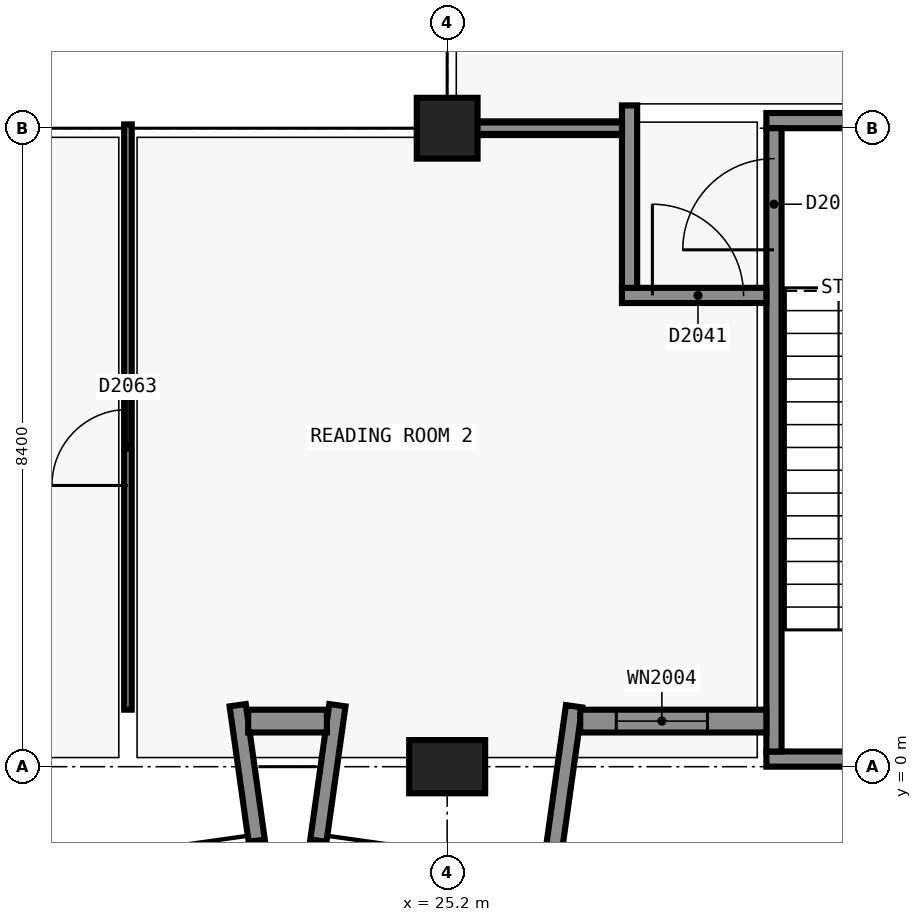
"""IFC4 building model, lengths in metres.
Left out: names, types, materials, properties, quantities, classifications, styles, units other than length and angle.
Written with IfcOpenShell. Run it as: python <this file> out.ifc"""

import sys

from ifc_helpers import new_model, si_unit, direction, frame, frame_2d, origin, origin_2d, place, context, subcontext, project, spatial, rectangle, extrude, element, fill, save


model = new_model("IFC4")
c1 = context("Model", 3, precision=1e-05, world=origin(), true_north=direction((0.0, 1.0)))
c2 = subcontext(c1, "Body", "Model", "MODEL_VIEW")
j1 = project(units=[si_unit("LENGTHUNIT", "METRE"), si_unit("PLANEANGLEUNIT", "RADIAN")], contexts=[c1])
p1 = place(None, origin())
s1 = spatial("IfcSite", under=j1, at=p1, CompositionType="ELEMENT")
p2 = place(p1, origin())
s2 = spatial("IfcBuilding", under=s1, at=p2, CompositionType="ELEMENT")
p3 = place(p2, frame((0.0, 0.0, 10.2)))
s3 = spatial("IfcBuildingStorey", under=s2, at=p3, CompositionType="ELEMENT", Elevation=10.2)
p4 = place(p3, frame((33.6, 0.1, 0.0), z_axis=(0.0, 0.0, 1.0), x_axis=(-1.0, 0.0, 0.0)))
e1 = element("IfcWall", 1, at=p4, inside=s3, PredefinedType="SHEAR", context=c2, shape_type="SweptSolid", body=[
    extrude(rectangle(XDim=4.2, YDim=0.2, at=frame_2d((2.1, 0.0))), origin(), (0.0, 0.0, 1.0), 4.8),
])
p5 = place(p3, frame((29.4, 8.5, 0.0), z_axis=(0.0, 0.0, 1.0), x_axis=(1.0, 0.0, 0.0)))
e2 = element("IfcWall", 2, at=p5, inside=s3, PredefinedType="SHEAR", context=c2, shape_type="SweptSolid", body=[
    extrude(rectangle(XDim=4.2, YDim=0.2, at=frame_2d((2.1, 0.0))), origin(), (0.0, 0.0, 1.0), 4.8),
])
p6 = place(p5, frame((1.5, 0.0, 0.0)))
e3 = element("IfcOpeningElement", 3, at=p6, cuts=e2, PredefinedType="OPENING", context=c2, shape_type="SweptSolid", body=[
    extrude(rectangle(XDim=1.2, YDim=2.1, at=frame_2d((0.6, 1.05))), frame((0.0, 0.11, 0.0), z_axis=(0.0, -1.0, 0.0), x_axis=(1.0, 0.0, 0.0)), (0.0, 0.0, 1.0), 0.22),
])
p7 = place(p3, frame((29.5, 0.2, 0.0), z_axis=(0.0, 0.0, 1.0), x_axis=(0.0, 1.0, 0.0)))
e4 = element("IfcWall", 4, at=p7, inside=s3, PredefinedType="SHEAR", context=c2, shape_type="SweptSolid", body=[
    extrude(rectangle(XDim=8.2, YDim=0.2, at=frame_2d((4.1, 0.0))), origin(), (0.0, 0.0, 1.0), 4.8),
])
p8 = place(p7, frame((6.6, 0.0, 0.0)))
e5 = element("IfcOpeningElement", 5, at=p8, cuts=e4, PredefinedType="OPENING", context=c2, shape_type="SweptSolid", body=[
    extrude(rectangle(XDim=1.2, YDim=2.1, at=frame_2d((0.6, 1.05))), frame((0.0, 0.11, 0.0), z_axis=(0.0, -1.0, 0.0), x_axis=(1.0, 0.0, 0.0)), (0.0, 0.0, 1.0), 0.22),
])
p9 = place(p3, frame((25.2, 0.0, 0.0), z_axis=(0.0, 0.0, 1.0), x_axis=(1.0, 0.0, 0.0)))
e6 = element("IfcColumn", 6, at=p9, inside=s3, PredefinedType="COLUMN", context=c2, shape_type="SweptSolid", body=[
    extrude(rectangle(XDim=1.0, YDim=0.7, at=origin_2d()), origin(), (0.0, 0.0, 1.0), 4.8),
])
p10 = place(p3, frame((25.2, 8.4, 0.0), z_axis=(0.0, 0.0, 1.0), x_axis=(1.0, 0.0, 0.0)))
e7 = element("IfcColumn", 7, at=p10, inside=s3, PredefinedType="COLUMN", context=c2, shape_type="SweptSolid", body=[
    extrude(rectangle(XDim=0.8, YDim=0.8, at=origin_2d()), origin(), (0.0, 0.0, 1.0), 4.8),
])
for number, where, z_axis, x_axis in (
    (8, (22.444, 0.809, 0.0), (0.0, 0.0, 1.0), (0.139, -0.99, 0.0)),
    (9, (23.756, 0.809, 0.0), (0.0, 0.0, 1.0), (-0.139, -0.99, 0.0)),
):
    element("IfcWall", number, at=place(p3, frame(where, z_axis=z_axis, x_axis=x_axis)), inside=s3, PredefinedType="SOLIDWALL", context=c2, shape_type="SweptSolid", body=[
        extrude(rectangle(XDim=1.8, YDim=0.215, at=frame_2d((0.9, 0.0))), origin(), (0.0, 0.0, 1.0), 4.5),
    ])
p11 = place(p3, frame((26.869, 0.795, 0.0), z_axis=(0.0, 0.0, 1.0), x_axis=(-0.139141913905, -0.990272451295, 0.0)))
e10 = element("IfcWall", 10, at=p11, inside=s3, PredefinedType="SOLIDWALL", context=c2, shape_type="SweptSolid", body=[
    extrude(rectangle(XDim=2.219, YDim=0.215, at=frame_2d((1.11, 0.0))), origin(), (0.0, 0.0, 1.0), 4.5),
])
p12 = place(p3, frame((23.618, 0.6, 0.0), z_axis=(0.0, 0.0, 1.0), x_axis=(-1.0, 0.0, 0.0)))
e11 = element("IfcWall", 11, at=p12, inside=s3, PredefinedType="SOLIDWALL", context=c2, shape_type="SweptSolid", body=[
    extrude(rectangle(XDim=1.036, YDim=0.3, at=frame_2d((0.518, 0.0))), origin(), (0.0, 0.0, 1.0), 4.5),
])
p13 = place(p3, frame((29.4, 0.6, 0.0), z_axis=(0.0, 0.0, 1.0), x_axis=(-1.0, 0.0, 0.0)))
e12 = element("IfcWall", 12, at=p13, inside=s3, PredefinedType="SOLIDWALL", context=c2, shape_type="SweptSolid", body=[
    extrude(rectangle(XDim=2.449, YDim=0.3, at=frame_2d((1.225, 0.0))), origin(), (0.0, 0.0, 1.0), 4.5),
])
p14 = place(p13, frame((0.775, 0.0, 0.9)))
e13 = element("IfcOpeningElement", 13, at=p14, cuts=e12, PredefinedType="OPENING", context=c2, shape_type="SweptSolid", body=[
    extrude(rectangle(XDim=1.2, YDim=1.5, at=frame_2d((0.6, 0.75))), frame((0.0, 0.16, 0.0), z_axis=(0.0, -1.0, 0.0), x_axis=(1.0, 0.0, 0.0)), (0.0, 0.0, 1.0), 0.32),
])
p15 = place(p3, frame((27.5, 6.2, 0.0), z_axis=(0.0, 0.0, 1.0), x_axis=(1.0, 0.0, 0.0)))
e14 = element("IfcWall", 14, at=p15, inside=s3, PredefinedType="SOLIDWALL", context=c2, shape_type="SweptSolid", body=[
    extrude(rectangle(XDim=1.9, YDim=0.2, at=frame_2d((0.95, 0.0))), origin(), (0.0, 0.0, 1.0), 4.5),
])
p16 = place(p15, frame((0.4, 0.0, 0.0)))
e15 = element("IfcOpeningElement", 15, at=p16, cuts=e14, PredefinedType="OPENING", context=c2, shape_type="SweptSolid", body=[
    extrude(rectangle(XDim=1.2, YDim=2.1, at=frame_2d((0.6, 1.05))), frame((0.0, 0.11, 0.0), z_axis=(0.0, -1.0, 0.0), x_axis=(1.0, 0.0, 0.0)), (0.0, 0.0, 1.0), 0.22),
])
p17 = place(p3, frame((27.6, 6.3, 0.0), z_axis=(0.0, 0.0, 1.0), x_axis=(0.0, 1.0, 0.0)))
e16 = element("IfcWall", 16, at=p17, inside=s3, PredefinedType="SOLIDWALL", context=c2, shape_type="SweptSolid", body=[
    extrude(rectangle(XDim=2.4, YDim=0.2, at=frame_2d((1.2, 0.0))), origin(), (0.0, 0.0, 1.0), 4.0),
])
p18 = place(p3, frame((25.125, 8.4, 0.0), z_axis=(0.0, 0.0, 1.0), x_axis=(1.0, 0.0, 0.0)))
e17 = element("IfcWall", 17, at=p18, inside=s3, PredefinedType="PARTITIONING", context=c2, shape_type="SweptSolid", body=[
    extrude(rectangle(XDim=2.375, YDim=0.15, at=frame_2d((1.188, 0.0))), origin(), (0.0, 0.0, 1.0), 3.8),
])
p19 = place(p3, frame((21.0, 0.75, 0.0), z_axis=(0.0, 0.0, 1.0), x_axis=(0.0, 1.0, 0.0)))
e18 = element("IfcWall", 18, at=p19, inside=s3, PredefinedType="PARTITIONING", context=c2, shape_type="SweptSolid", body=[
    extrude(rectangle(XDim=7.7, YDim=0.1, at=frame_2d((3.85, 0.0))), origin(), (0.0, 0.0, 1.0), 3.8),
])
p20 = place(p19, frame((2.95, 0.0, 0.0)))
e19 = element("IfcOpeningElement", 19, at=p20, cuts=e18, PredefinedType="OPENING", context=c2, shape_type="SweptSolid", body=[
    extrude(rectangle(XDim=1.0, YDim=2.1, at=frame_2d((0.5, 1.05))), frame((0.0, 0.06, 0.0), z_axis=(0.0, -1.0, 0.0), x_axis=(1.0, 0.0, 0.0)), (0.0, 0.0, 1.0), 0.12),
])
p21 = place(p14, origin())
e20 = element("IfcWindow", 20, at=p21, inside=s3, PartitioningType="SINGLE_PANEL", PredefinedType="WINDOW", context=c2, shape_type="SweptSolid", body=[
    extrude(rectangle(XDim=1.2, YDim=1.5, at=frame_2d((0.6, 0.75))), frame((0.0, 0.03, 0.0), z_axis=(0.0, -1.0, 0.0), x_axis=(1.0, 0.0, 0.0)), (0.0, 0.0, 1.0), 0.06),
])
fill(e13, e20)
p22 = place(p8, origin())
e21 = element("IfcDoor", 21, at=p22, inside=s3, OperationType="SINGLE_SWING_RIGHT", PredefinedType="DOOR", context=c2, shape_type="SweptSolid", body=[
    extrude(rectangle(XDim=1.2, YDim=2.1, at=frame_2d((0.6, 1.05))), frame((0.0, 0.025, 0.0), z_axis=(0.0, -1.0, 0.0), x_axis=(1.0, 0.0, 0.0)), (0.0, 0.0, 1.0), 0.05),
])
fill(e5, e21)
p23 = place(p16, origin())
e22 = element("IfcDoor", 22, at=p23, inside=s3, OperationType="SINGLE_SWING_RIGHT", PredefinedType="DOOR", context=c2, shape_type="SweptSolid", body=[
    extrude(rectangle(XDim=1.2, YDim=2.1, at=frame_2d((0.6, 1.05))), frame((0.0, 0.025, 0.0), z_axis=(0.0, -1.0, 0.0), x_axis=(1.0, 0.0, 0.0)), (0.0, 0.0, 1.0), 0.05),
])
fill(e15, e22)
p24 = place(p20, origin())
e23 = element("IfcDoor", 23, at=p24, inside=s3, OperationType="SINGLE_SWING_RIGHT", PredefinedType="DOOR", context=c2, shape_type="SweptSolid", body=[
    extrude(rectangle(XDim=1.0, YDim=2.1, at=frame_2d((0.5, 1.05))), frame((0.0, 0.025, 0.0), z_axis=(0.0, -1.0, 0.0), x_axis=(1.0, 0.0, 0.0)), (0.0, 0.0, 1.0), 0.05),
])
fill(e19, e23)
save(model, sys.argv[1])
